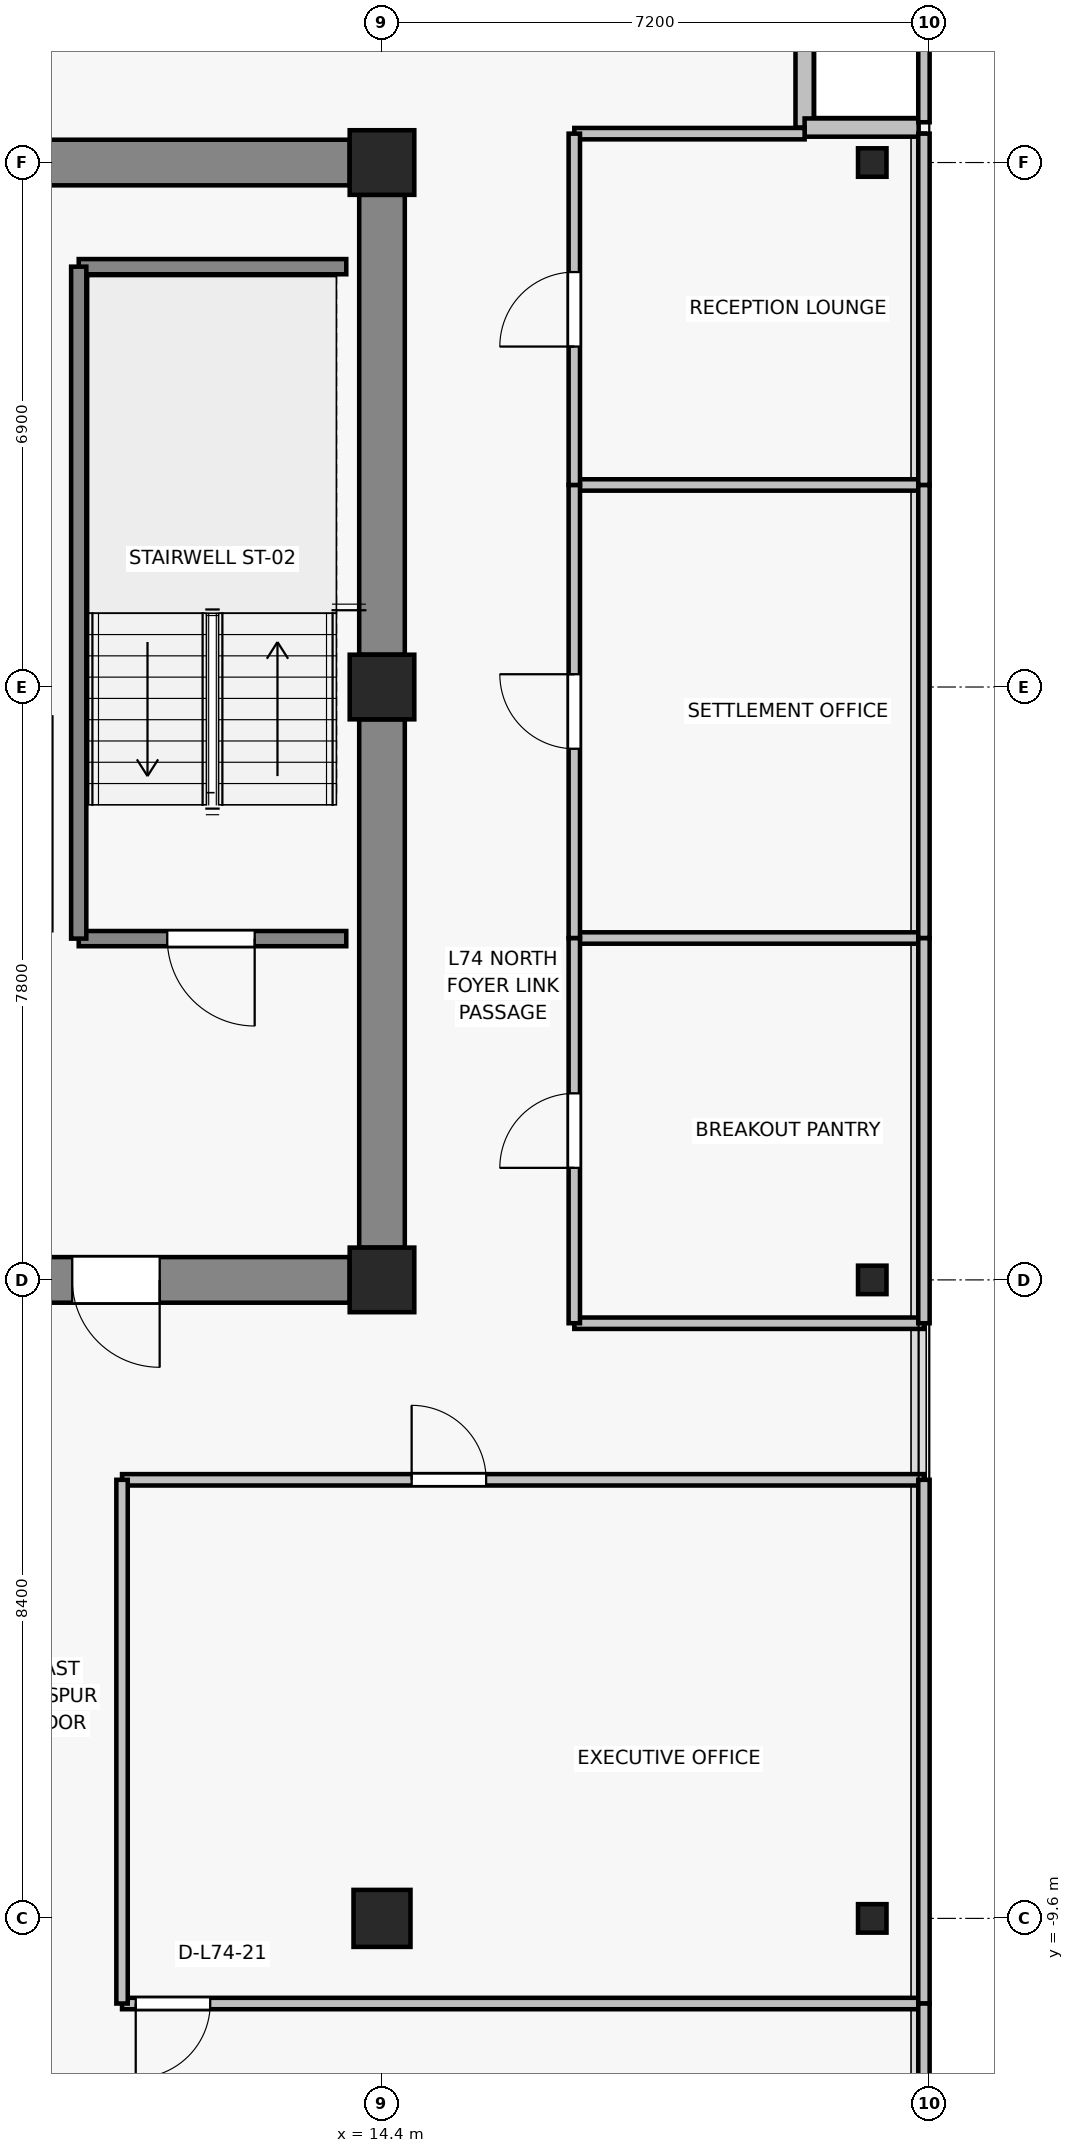
"""IFC4 building model, lengths in metres.
Left out: names, types, materials, properties, quantities, classifications, styles, units other than length and angle.
Written with IfcOpenShell. Run it as: python <this file> out.ifc"""

import sys

from ifc_helpers import new_model, si_unit, direction, frame, frame_2d, origin, origin_2d, place, context, subcontext, project, spatial, rectangle, i_section, extrude, source, transform, mapped, element, fill, save


model = new_model("IFC4")
c1 = context("Model", 3, precision=1e-05, world=origin(), true_north=direction((0.0, 1.0)))
c2 = subcontext(c1, "Body", "Model", "MODEL_VIEW")
j1 = project(units=[si_unit("LENGTHUNIT", "METRE"), si_unit("PLANEANGLEUNIT", "RADIAN")], contexts=[c1])
p1 = place(None, origin())
s1 = spatial("IfcSite", under=j1, at=p1, CompositionType="ELEMENT")
p2 = place(p1, origin())
s2 = spatial("IfcBuilding", under=s1, at=p2, CompositionType="ELEMENT")
p3 = place(p2, frame((0.0, 0.0, 261.7)))
s3 = spatial("IfcBuildingStorey", under=s2, at=p3, CompositionType="ELEMENT", Elevation=261.7)
for number, where, z_axis, x_axis in (
    (1, (14.4, -1.2, 0.0), (0.0, 0.0, 1.0), (1.0, 0.0, 0.0)),
    (2, (14.4, 6.6, 0.0), (0.0, 0.0, 1.0), (1.0, 0.0, 0.0)),
    (3, (14.4, 13.5, 0.0), (0.0, 0.0, 1.0), (1.0, 0.0, 0.0)),
):
    element("IfcColumn", number, at=place(p3, frame(where, z_axis=z_axis, x_axis=x_axis)), inside=s3, PredefinedType="COLUMN", context=c2, shape_type="SweptSolid", body=[
        extrude(rectangle(XDim=0.85, YDim=0.85, at=origin_2d()), origin(), (0.0, 0.0, 1.0), 3.3),
    ])
p4 = place(p3, frame((14.4, -9.6, 0.0), z_axis=(0.0, 0.0, 1.0), x_axis=(1.0, 0.0, 0.0)))
e4 = element("IfcColumn", 4, at=p4, inside=s3, PredefinedType="COLUMN", context=c2, shape_type="SweptSolid", body=[
    extrude(rectangle(XDim=0.75, YDim=0.75, at=origin_2d()), origin(), (0.0, 0.0, 1.0), 3.3),
])
for number, where, z_axis, x_axis in (
    (5, (20.85, -9.6, 0.0), (0.0, 0.0, 1.0), (1.0, 0.0, 0.0)),
    (6, (20.85, -1.2, 0.0), (0.0, 0.0, 1.0), (1.0, 0.0, 0.0)),
    (7, (20.85, 13.5, 0.0), (0.0, 0.0, 1.0), (1.0, 0.0, 0.0)),
):
    element("IfcColumn", number, at=place(p3, frame(where, z_axis=z_axis, x_axis=x_axis)), inside=s3, PredefinedType="COLUMN", context=c2, shape_type="SweptSolid", body=[
        extrude(i_section(OverallWidth=0.375, OverallDepth=0.375, WebThickness=0.017, FlangeThickness=0.027, FilletRadius=0.015, at=origin_2d()), origin(), (0.0, 0.0, 1.0), 3.3),
    ])
p5 = place(p3, frame((7.625, 13.5, 0.0), z_axis=(0.0, 0.0, 1.0), x_axis=(1.0, 0.0, 0.0)))
e8 = element("IfcWall", 8, at=p5, inside=s3, PredefinedType="SHEAR", context=c2, shape_type="SweptSolid", body=[
    extrude(rectangle(XDim=6.35, YDim=0.6, at=frame_2d((3.175, 0.0))), origin(), (0.0, 0.0, 1.0), 3.075),
])
p6 = place(p3, frame((14.4, -0.775, 0.0), z_axis=(0.0, 0.0, 1.0), x_axis=(0.0, 1.0, 0.0)))
e9 = element("IfcWall", 9, at=p6, inside=s3, PredefinedType="SHEAR", context=c2, shape_type="SweptSolid", body=[
    extrude(rectangle(XDim=6.95, YDim=0.6, at=frame_2d((3.475, 0.0))), origin(), (0.0, 0.0, 1.0), 3.075),
])
p7 = place(p3, frame((14.4, 7.025, 0.0), z_axis=(0.0, 0.0, 1.0), x_axis=(0.0, 1.0, 0.0)))
e10 = element("IfcWall", 10, at=p7, inside=s3, PredefinedType="SHEAR", context=c2, shape_type="SweptSolid", body=[
    extrude(rectangle(XDim=6.05, YDim=0.6, at=frame_2d((3.025, 0.0))), origin(), (0.0, 0.0, 1.0), 3.075),
])
p8 = place(p3, frame((13.975, -1.2, 0.0), z_axis=(0.0, 0.0, 1.0), x_axis=(-1.0, 0.0, 0.0)))
e11 = element("IfcWall", 11, at=p8, inside=s3, PredefinedType="SHEAR", context=c2, shape_type="SweptSolid", body=[
    extrude(rectangle(XDim=6.35, YDim=0.6, at=frame_2d((3.175, 0.0))), origin(), (0.0, 0.0, 1.0), 3.075),
])
p9 = place(p8, frame((2.5, 0.0, 0.0)))
e12 = element("IfcOpeningElement", 12, at=p9, cuts=e11, PredefinedType="OPENING", context=c2, shape_type="SweptSolid", body=[
    extrude(rectangle(XDim=1.15, YDim=2.15, at=frame_2d((0.575, 1.075))), frame((0.0, 0.31, 0.0), z_axis=(0.0, -1.0, 0.0), x_axis=(1.0, 0.0, 0.0)), (0.0, 0.0, 1.0), 0.62),
])
for number, where, z_axis, x_axis in (
    (13, (19.96, 13.96, 0.0), (0.0, 0.0, 1.0), (0.0, 1.0, 0.0)),
    (14, (21.46, 13.96, 0.0), (0.0, 0.0, 1.0), (-1.0, 0.0, 0.0)),
):
    element("IfcWall", number, at=place(p3, frame(where, z_axis=z_axis, x_axis=x_axis)), inside=s3, PredefinedType="SOLIDWALL", context=c2, shape_type="SweptSolid", body=[
        extrude(rectangle(XDim=1.5, YDim=0.24, at=frame_2d((0.75, 0.0))), origin(), (0.0, 0.0, 1.0), 3.075),
    ])
p10 = place(p3, frame((13.93, 3.29, 0.0), z_axis=(0.0, 0.0, 1.0), x_axis=(-1.0, 0.0, 0.0)))
e15 = element("IfcWall", 15, at=p10, inside=s3, PredefinedType="SOLIDWALL", context=c2, shape_type="SweptSolid", body=[
    extrude(rectangle(XDim=3.52, YDim=0.2, at=frame_2d((1.76, 0.0))), origin(), (0.0, 0.0, 1.0), 3.075),
])
p11 = place(p10, frame((1.205, 0.0, 0.0)))
e16 = element("IfcOpeningElement", 16, at=p11, cuts=e15, PredefinedType="OPENING", context=c2, shape_type="SweptSolid", body=[
    extrude(rectangle(XDim=1.15, YDim=2.15, at=frame_2d((0.575, 1.075))), frame((0.0, 0.11, 0.0), z_axis=(0.0, -1.0, 0.0), x_axis=(1.0, 0.0, 0.0)), (0.0, 0.0, 1.0), 0.22),
])
p12 = place(p3, frame((10.41, 12.13, 0.0), z_axis=(0.0, 0.0, 1.0), x_axis=(1.0, 0.0, 0.0)))
e17 = element("IfcWall", 17, at=p12, inside=s3, PredefinedType="SOLIDWALL", context=c2, shape_type="SweptSolid", body=[
    extrude(rectangle(XDim=3.52, YDim=0.2, at=frame_2d((1.76, 0.0))), origin(), (0.0, 0.0, 1.0), 3.075),
])
p13 = place(p3, frame((10.41, 3.29, 0.0), z_axis=(0.0, 0.0, 1.0), x_axis=(0.0, 1.0, 0.0)))
e18 = element("IfcWall", 18, at=p13, inside=s3, PredefinedType="SOLIDWALL", context=c2, shape_type="SweptSolid", body=[
    extrude(rectangle(XDim=8.84, YDim=0.2, at=frame_2d((4.42, 0.0))), origin(), (0.0, 0.0, 1.0), 3.075),
])
p14 = place(p3, frame((21.53, -10.72, 0.0), z_axis=(0.0, 0.0, 1.0), x_axis=(-1.0, 0.0, 0.0)))
e19 = element("IfcWall", 19, at=p14, inside=s3, PredefinedType="PARTITIONING", context=c2, shape_type="SweptSolid", body=[
    extrude(rectangle(XDim=10.55, YDim=0.15, at=frame_2d((5.275, 0.0))), origin(), (0.0, 0.0, 1.0), 2.615),
])
p15 = place(p14, frame((9.39, 0.0, 0.0)))
e20 = element("IfcOpeningElement", 20, at=p15, cuts=e19, PredefinedType="OPENING", context=c2, shape_type="SweptSolid", body=[
    extrude(rectangle(XDim=0.98, YDim=2.15, at=frame_2d((0.49, 1.075))), frame((0.0, 0.085, 0.0), z_axis=(0.0, -1.0, 0.0), x_axis=(1.0, 0.0, 0.0)), (0.0, 0.0, 1.0), 0.17),
])
p16 = place(p3, frame((10.98, -3.83, 0.0), z_axis=(0.0, 0.0, 1.0), x_axis=(1.0, 0.0, 0.0)))
e21 = element("IfcWall", 21, at=p16, inside=s3, PredefinedType="PARTITIONING", context=c2, shape_type="SweptSolid", body=[
    extrude(rectangle(XDim=10.55, YDim=0.15, at=frame_2d((5.275, 0.0))), origin(), (0.0, 0.0, 1.0), 2.615),
])
p17 = place(p16, frame((3.81, 0.0, 0.0)))
e22 = element("IfcOpeningElement", 22, at=p17, cuts=e21, PredefinedType="OPENING", context=c2, shape_type="SweptSolid", body=[
    extrude(rectangle(XDim=0.98, YDim=2.15, at=frame_2d((0.49, 1.075))), frame((0.0, 0.085, 0.0), z_axis=(0.0, -1.0, 0.0), x_axis=(1.0, 0.0, 0.0)), (0.0, 0.0, 1.0), 0.17),
])
p18 = place(p3, frame((10.98, -10.72, 0.0), z_axis=(0.0, 0.0, 1.0), x_axis=(0.0, 1.0, 0.0)))
e23 = element("IfcWall", 23, at=p18, inside=s3, PredefinedType="PARTITIONING", context=c2, shape_type="SweptSolid", body=[
    extrude(rectangle(XDim=6.89, YDim=0.15, at=frame_2d((3.445, 0.0))), origin(), (0.0, 0.0, 1.0), 2.615),
])
p19 = place(p3, frame((21.53, -3.83, 0.0), z_axis=(0.0, 0.0, 1.0), x_axis=(0.0, -1.0, 0.0)))
e24 = element("IfcWall", 24, at=p19, inside=s3, PredefinedType="PARTITIONING", context=c2, shape_type="SweptSolid", body=[
    extrude(rectangle(XDim=6.89, YDim=0.15, at=frame_2d((3.445, 0.0))), origin(), (0.0, 0.0, 1.0), 2.665),
])
p20 = place(p3, frame((21.53, -10.72, 0.0), z_axis=(0.0, 0.0, 1.0), x_axis=(0.0, -1.0, 0.0)))
e25 = element("IfcWall", 25, at=p20, inside=s3, PredefinedType="PARTITIONING", context=c2, shape_type="SweptSolid", body=[
    extrude(rectangle(XDim=6.31, YDim=0.15, at=frame_2d((3.155, 0.0))), origin(), (0.0, 0.0, 1.0), 3.075),
])
for number, where, z_axis, x_axis in (
    (26, (21.53, -1.77, 0.0), (0.0, 0.0, 1.0), (-1.0, 0.0, 0.0)),
    (27, (16.93, 3.298, 0.0), (0.0, 0.0, 1.0), (1.0, 0.0, 0.0)),
):
    element("IfcWall", number, at=place(p3, frame(where, z_axis=z_axis, x_axis=x_axis)), inside=s3, PredefinedType="PARTITIONING", context=c2, shape_type="SweptSolid", body=[
        extrude(rectangle(XDim=4.6, YDim=0.15, at=frame_2d((2.3, 0.0))), origin(), (0.0, 0.0, 1.0), 2.765),
    ])
p21 = place(p3, frame((16.93, -1.77, 0.0), z_axis=(0.0, 0.0, 1.0), x_axis=(0.0, 1.0, 0.0)))
e28 = element("IfcWall", 28, at=p21, inside=s3, PredefinedType="PARTITIONING", context=c2, shape_type="SweptSolid", body=[
    extrude(rectangle(XDim=5.068, YDim=0.15, at=frame_2d((2.534, 0.0))), origin(), (0.0, 0.0, 1.0), 2.615),
])
p22 = place(p21, frame((2.044, 0.0, 0.0)))
e29 = element("IfcOpeningElement", 29, at=p22, cuts=e28, PredefinedType="OPENING", context=c2, shape_type="SweptSolid", body=[
    extrude(rectangle(XDim=0.98, YDim=2.15, at=frame_2d((0.49, 1.075))), frame((0.0, 0.085, 0.0), z_axis=(0.0, -1.0, 0.0), x_axis=(1.0, 0.0, 0.0)), (0.0, 0.0, 1.0), 0.17),
])
p23 = place(p3, frame((21.53, 3.298, 0.0), z_axis=(0.0, 0.0, 1.0), x_axis=(0.0, -1.0, 0.0)))
e30 = element("IfcWall", 30, at=p23, inside=s3, PredefinedType="PARTITIONING", context=c2, shape_type="SweptSolid", body=[
    extrude(rectangle(XDim=5.068, YDim=0.15, at=frame_2d((2.534, 0.0))), origin(), (0.0, 0.0, 1.0), 3.075),
])
p24 = place(p3, frame((16.93, 9.258, 0.0), z_axis=(0.0, 0.0, 1.0), x_axis=(1.0, 0.0, 0.0)))
e31 = element("IfcWall", 31, at=p24, inside=s3, PredefinedType="PARTITIONING", context=c2, shape_type="SweptSolid", body=[
    extrude(rectangle(XDim=4.6, YDim=0.15, at=frame_2d((2.3, 0.0))), origin(), (0.0, 0.0, 1.0), 2.765),
])
p25 = place(p3, frame((16.93, 3.298, 0.0), z_axis=(0.0, 0.0, 1.0), x_axis=(0.0, 1.0, 0.0)))
e32 = element("IfcWall", 32, at=p25, inside=s3, PredefinedType="PARTITIONING", context=c2, shape_type="SweptSolid", body=[
    extrude(rectangle(XDim=5.96, YDim=0.15, at=frame_2d((2.98, 0.0))), origin(), (0.0, 0.0, 1.0), 3.075),
])
p26 = place(p25, frame((2.49, 0.0, 0.0)))
e33 = element("IfcOpeningElement", 33, at=p26, cuts=e32, PredefinedType="OPENING", context=c2, shape_type="SweptSolid", body=[
    extrude(rectangle(XDim=0.98, YDim=2.15, at=frame_2d((0.49, 1.075))), frame((0.0, 0.085, 0.0), z_axis=(0.0, -1.0, 0.0), x_axis=(1.0, 0.0, 0.0)), (0.0, 0.0, 1.0), 0.17),
])
p27 = place(p3, frame((21.53, 9.258, 0.0), z_axis=(0.0, 0.0, 1.0), x_axis=(0.0, -1.0, 0.0)))
e34 = element("IfcWall", 34, at=p27, inside=s3, PredefinedType="PARTITIONING", context=c2, shape_type="SweptSolid", body=[
    extrude(rectangle(XDim=5.96, YDim=0.15, at=frame_2d((2.98, 0.0))), origin(), (0.0, 0.0, 1.0), 3.075),
])
p28 = place(p3, frame((16.93, 13.88, 0.0), z_axis=(0.0, 0.0, 1.0), x_axis=(1.0, 0.0, 0.0)))
e35 = element("IfcWall", 35, at=p28, inside=s3, PredefinedType="PARTITIONING", context=c2, shape_type="SweptSolid", body=[
    extrude(rectangle(XDim=3.03, YDim=0.15, at=frame_2d((1.515, 0.0))), origin(), (0.0, 0.0, 1.0), 3.075),
])
p29 = place(p3, frame((16.93, 9.258, 0.0), z_axis=(0.0, 0.0, 1.0), x_axis=(0.0, 1.0, 0.0)))
e36 = element("IfcWall", 36, at=p29, inside=s3, PredefinedType="PARTITIONING", context=c2, shape_type="SweptSolid", body=[
    extrude(rectangle(XDim=4.622, YDim=0.15, at=frame_2d((2.311, 0.0))), origin(), (0.0, 0.0, 1.0), 2.615),
])
p30 = place(p29, frame((1.821, 0.0, 0.0)))
e37 = element("IfcOpeningElement", 37, at=p30, cuts=e36, PredefinedType="OPENING", context=c2, shape_type="SweptSolid", body=[
    extrude(rectangle(XDim=0.98, YDim=2.15, at=frame_2d((0.49, 1.075))), frame((0.0, 0.085, 0.0), z_axis=(0.0, -1.0, 0.0), x_axis=(1.0, 0.0, 0.0)), (0.0, 0.0, 1.0), 0.17),
])
p31 = place(p3, frame((21.53, 13.88, 0.0), z_axis=(0.0, 0.0, 1.0), x_axis=(0.0, -1.0, 0.0)))
e38 = element("IfcWall", 38, at=p31, inside=s3, PredefinedType="PARTITIONING", context=c2, shape_type="SweptSolid", body=[
    extrude(rectangle(XDim=4.622, YDim=0.15, at=frame_2d((2.311, 0.0))), origin(), (0.0, 0.0, 1.0), 3.075),
])
p32 = place(p3, frame((21.53, 17.03, 0.0), z_axis=(0.0, 0.0, 1.0), x_axis=(0.0, -1.0, 0.0)))
e39 = element("IfcWall", 39, at=p32, inside=s3, PredefinedType="PARTITIONING", context=c2, shape_type="SweptSolid", body=[
    extrude(rectangle(XDim=3.0, YDim=0.15, at=frame_2d((1.5, 0.0))), origin(), (0.0, 0.0, 1.0), 3.075),
])
m1 = source(origin(), c2, "Body", "SweptSolid", [
    extrude(rectangle(XDim=1.15, YDim=2.15, at=frame_2d((0.575, 1.075))), frame((0.0, 0.025, 0.0), z_axis=(0.0, -1.0, 0.0), x_axis=(1.0, 0.0, 0.0)), (0.0, 0.0, 1.0), 0.05),
])
p33 = place(p11, origin())
e40 = element("IfcDoor", 40, at=p33, inside=s3, OperationType="SINGLE_SWING_LEFT", PredefinedType="DOOR", context=c2, shape_type="MappedRepresentation", body=[
    mapped(m1, transform((0.0, 0.0, 0.0), x_axis=(1.0, 0.0, 0.0), y_axis=(0.0, 1.0, 0.0), z_axis=(0.0, 0.0, 1.0), scale=1.0)),
])
fill(e16, e40)
p34 = place(p9, origin())
e41 = element("IfcDoor", 41, at=p34, inside=s3, OperationType="SINGLE_SWING_LEFT", PredefinedType="DOOR", context=c2, shape_type="MappedRepresentation", body=[
    mapped(m1, transform((0.0, 0.0, 0.0), x_axis=(1.0, 0.0, 0.0), y_axis=(0.0, 1.0, 0.0), z_axis=(0.0, 0.0, 1.0), scale=1.0)),
])
fill(e12, e41)
m2 = source(origin(), c2, "Body", "SweptSolid", [
    extrude(rectangle(XDim=0.98, YDim=2.15, at=frame_2d((0.49, 1.075))), frame((0.0, 0.025, 0.0), z_axis=(0.0, -1.0, 0.0), x_axis=(1.0, 0.0, 0.0)), (0.0, 0.0, 1.0), 0.05),
])
p35 = place(p17, origin())
e42 = element("IfcDoor", 42, at=p35, inside=s3, OperationType="SINGLE_SWING_LEFT", PredefinedType="DOOR", context=c2, shape_type="MappedRepresentation", body=[
    mapped(m2, transform((0.0, 0.0, 0.0), x_axis=(1.0, 0.0, 0.0), y_axis=(0.0, 1.0, 0.0), z_axis=(0.0, 0.0, 1.0), scale=1.0)),
])
fill(e22, e42)
p36 = place(p15, origin())
e43 = element("IfcDoor", 43, at=p36, inside=s3, OperationType="SINGLE_SWING_RIGHT", PredefinedType="DOOR", context=c2, shape_type="MappedRepresentation", body=[
    mapped(m2, transform((0.0, 0.0, 0.0), x_axis=(1.0, 0.0, 0.0), y_axis=(0.0, 1.0, 0.0), z_axis=(0.0, 0.0, 1.0), scale=1.0)),
])
fill(e20, e43)
p37 = place(p22, origin())
e44 = element("IfcDoor", 44, at=p37, inside=s3, OperationType="SINGLE_SWING_LEFT", PredefinedType="DOOR", context=c2, shape_type="MappedRepresentation", body=[
    mapped(m2, transform((0.0, 0.0, 0.0), x_axis=(1.0, 0.0, 0.0), y_axis=(0.0, 1.0, 0.0), z_axis=(0.0, 0.0, 1.0), scale=1.0)),
])
fill(e29, e44)
p38 = place(p26, origin())
e45 = element("IfcDoor", 45, at=p38, inside=s3, OperationType="SINGLE_SWING_RIGHT", PredefinedType="DOOR", context=c2, shape_type="MappedRepresentation", body=[
    mapped(m2, transform((0.0, 0.0, 0.0), x_axis=(1.0, 0.0, 0.0), y_axis=(0.0, 1.0, 0.0), z_axis=(0.0, 0.0, 1.0), scale=1.0)),
])
fill(e33, e45)
p39 = place(p30, origin())
e46 = element("IfcDoor", 46, at=p39, inside=s3, OperationType="SINGLE_SWING_LEFT", PredefinedType="DOOR", context=c2, shape_type="MappedRepresentation", body=[
    mapped(m2, transform((0.0, 0.0, 0.0), x_axis=(1.0, 0.0, 0.0), y_axis=(0.0, 1.0, 0.0), z_axis=(0.0, 0.0, 1.0), scale=1.0)),
])
fill(e37, e46)
save(model, sys.argv[1])
